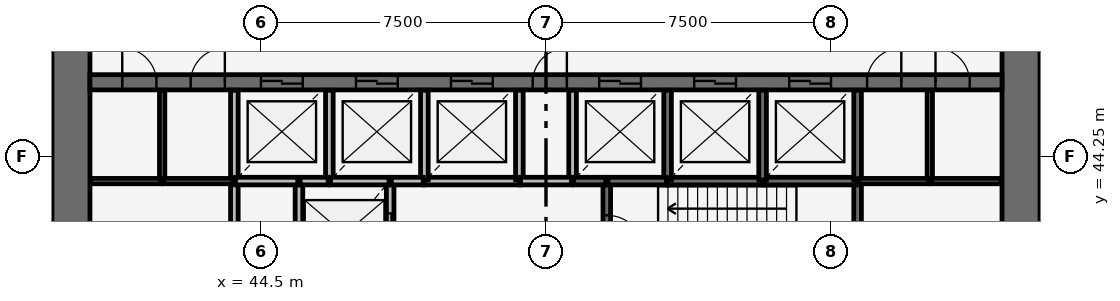
"""IFC4 building model, lengths in metres.
Left out: names, types, materials, properties, quantities, classifications, styles, units other than length and angle.
Written with IfcOpenShell. Run it as: python <this file> out.ifc"""

import sys

from ifc_helpers import new_model, si_unit, direction, frame, frame_2d, origin, place, context, subcontext, project, spatial, rectangle, extrude, source, transform, mapped, element, fill, save


model = new_model("IFC4")
c1 = context("Model", 3, precision=1e-05, world=origin(), true_north=direction((0.0, 1.0)))
c2 = subcontext(c1, "Body", "Model", "MODEL_VIEW")
j1 = project(units=[si_unit("LENGTHUNIT", "METRE"), si_unit("PLANEANGLEUNIT", "RADIAN")], contexts=[c1])
p1 = place(None, origin())
s1 = spatial("IfcSite", under=j1, at=p1, CompositionType="ELEMENT")
p2 = place(p1, origin())
s2 = spatial("IfcBuilding", under=s1, at=p2, CompositionType="ELEMENT")
p3 = place(p2, origin())
s3 = spatial("IfcBuildingStorey", under=s2, at=p3, CompositionType="ELEMENT", Elevation=0.0)
p4 = place(p3, frame((64.5, 38.0, -0.35), z_axis=(0.0, 0.0, 1.0), x_axis=(0.0, 1.0, 0.0)))
e1 = element("IfcWall", 1, at=p4, inside=s3, PredefinedType="SHEAR", context=c2, shape_type="SweptSolid", body=[
    extrude(rectangle(XDim=20.0, YDim=1.0, at=frame_2d((10.0, 0.0))), origin(), (0.0, 0.0, 1.0), 5.35),
])
p5 = place(p4, frame((9.1, 0.0, 0.35)))
e2 = element("IfcOpeningElement", 2, at=p5, cuts=e1, PredefinedType="OPENING", context=c2, shape_type="SweptSolid", body=[
    extrude(rectangle(XDim=1.8, YDim=2.1, at=frame_2d((0.9, 1.05))), frame((0.0, 0.51, 0.0), z_axis=(0.0, -1.0, 0.0), x_axis=(1.0, 0.0, 0.0)), (0.0, 0.0, 1.0), 1.02),
])
p6 = place(p3, frame((39.5, 58.0, -0.35), z_axis=(0.0, 0.0, 1.0), x_axis=(0.0, -1.0, 0.0)))
e3 = element("IfcWall", 3, at=p6, inside=s3, PredefinedType="SHEAR", context=c2, shape_type="SweptSolid", body=[
    extrude(rectangle(XDim=20.0, YDim=1.0, at=frame_2d((10.0, 0.0))), origin(), (0.0, 0.0, 1.0), 5.35),
])
p7 = place(p6, frame((9.1, 0.0, 0.35)))
e4 = element("IfcOpeningElement", 4, at=p7, cuts=e3, PredefinedType="OPENING", context=c2, shape_type="SweptSolid", body=[
    extrude(rectangle(XDim=1.8, YDim=2.1, at=frame_2d((0.9, 1.05))), frame((0.0, 0.51, 0.0), z_axis=(0.0, -1.0, 0.0), x_axis=(1.0, 0.0, 0.0)), (0.0, 0.0, 1.0), 1.02),
])
p8 = place(p3, frame((40.0, 46.2, -0.35), z_axis=(0.0, 0.0, 1.0), x_axis=(1.0, 0.0, 0.0)))
e5 = element("IfcWall", 5, at=p8, inside=s3, PredefinedType="SHEAR", context=c2, shape_type="SweptSolid", body=[
    extrude(rectangle(XDim=24.0, YDim=0.4, at=frame_2d((12.0, 0.0))), origin(), (0.0, 0.0, 1.0), 5.35),
])
p9 = place(p8, frame((13.4, 0.0, 0.35)))
e6 = element("IfcOpeningElement", 6, at=p9, cuts=e5, PredefinedType="OPENING", context=c2, shape_type="SweptSolid", body=[
    extrude(rectangle(XDim=1.1, YDim=2.1, at=frame_2d((0.55, 1.05))), frame((0.0, 0.21, 0.0), z_axis=(0.0, -1.0, 0.0), x_axis=(1.0, 0.0, 0.0)), (0.0, 0.0, 1.0), 0.42),
])
p10 = place(p8, frame((15.9, 0.0, 0.35)))
e7 = element("IfcOpeningElement", 7, at=p10, cuts=e5, PredefinedType="OPENING", context=c2, shape_type="SweptSolid", body=[
    extrude(rectangle(XDim=1.1, YDim=2.1, at=frame_2d((0.55, 1.05))), frame((0.0, 0.21, 0.0), z_axis=(0.0, -1.0, 0.0), x_axis=(1.0, 0.0, 0.0)), (0.0, 0.0, 1.0), 0.42),
])
p11 = place(p8, frame((18.4, 0.0, 0.35)))
e8 = element("IfcOpeningElement", 8, at=p11, cuts=e5, PredefinedType="OPENING", context=c2, shape_type="SweptSolid", body=[
    extrude(rectangle(XDim=1.1, YDim=2.1, at=frame_2d((0.55, 1.05))), frame((0.0, 0.21, 0.0), z_axis=(0.0, -1.0, 0.0), x_axis=(1.0, 0.0, 0.0)), (0.0, 0.0, 1.0), 0.42),
])
p12 = place(p8, frame((4.5, 0.0, 0.35)))
e9 = element("IfcOpeningElement", 9, at=p12, cuts=e5, PredefinedType="OPENING", context=c2, shape_type="SweptSolid", body=[
    extrude(rectangle(XDim=1.1, YDim=2.1, at=frame_2d((0.55, 1.05))), frame((0.0, 0.21, 0.0), z_axis=(0.0, -1.0, 0.0), x_axis=(1.0, 0.0, 0.0)), (0.0, 0.0, 1.0), 0.42),
])
p13 = place(p8, frame((7.0, 0.0, 0.35)))
e10 = element("IfcOpeningElement", 10, at=p13, cuts=e5, PredefinedType="OPENING", context=c2, shape_type="SweptSolid", body=[
    extrude(rectangle(XDim=1.1, YDim=2.1, at=frame_2d((0.55, 1.05))), frame((0.0, 0.21, 0.0), z_axis=(0.0, -1.0, 0.0), x_axis=(1.0, 0.0, 0.0)), (0.0, 0.0, 1.0), 0.42),
])
p14 = place(p8, frame((9.5, 0.0, 0.35)))
e11 = element("IfcOpeningElement", 11, at=p14, cuts=e5, PredefinedType="OPENING", context=c2, shape_type="SweptSolid", body=[
    extrude(rectangle(XDim=1.1, YDim=2.1, at=frame_2d((0.55, 1.05))), frame((0.0, 0.21, 0.0), z_axis=(0.0, -1.0, 0.0), x_axis=(1.0, 0.0, 0.0)), (0.0, 0.0, 1.0), 0.42),
])
p15 = place(p8, frame((20.45, 0.0, 0.35)))
e12 = element("IfcOpeningElement", 12, at=p15, cuts=e5, PredefinedType="OPENING", context=c2, shape_type="SweptSolid", body=[
    extrude(rectangle(XDim=0.9, YDim=2.1, at=frame_2d((0.45, 1.05))), frame((0.0, 0.21, 0.0), z_axis=(0.0, -1.0, 0.0), x_axis=(1.0, 0.0, 0.0)), (0.0, 0.0, 1.0), 0.42),
])
p16 = place(p8, frame((22.25, 0.0, 0.35)))
e13 = element("IfcOpeningElement", 13, at=p16, cuts=e5, PredefinedType="OPENING", context=c2, shape_type="SweptSolid", body=[
    extrude(rectangle(XDim=0.9, YDim=2.1, at=frame_2d((0.45, 1.05))), frame((0.0, 0.21, 0.0), z_axis=(0.0, -1.0, 0.0), x_axis=(1.0, 0.0, 0.0)), (0.0, 0.0, 1.0), 0.42),
])
p17 = place(p8, frame((0.85, 0.0, 0.35)))
e14 = element("IfcOpeningElement", 14, at=p17, cuts=e5, PredefinedType="OPENING", context=c2, shape_type="SweptSolid", body=[
    extrude(rectangle(XDim=0.9, YDim=2.1, at=frame_2d((0.45, 1.05))), frame((0.0, 0.21, 0.0), z_axis=(0.0, -1.0, 0.0), x_axis=(1.0, 0.0, 0.0)), (0.0, 0.0, 1.0), 0.42),
])
p18 = place(p8, frame((2.65, 0.0, 0.35)))
e15 = element("IfcOpeningElement", 15, at=p18, cuts=e5, PredefinedType="OPENING", context=c2, shape_type="SweptSolid", body=[
    extrude(rectangle(XDim=0.9, YDim=2.1, at=frame_2d((0.45, 1.05))), frame((0.0, 0.21, 0.0), z_axis=(0.0, -1.0, 0.0), x_axis=(1.0, 0.0, 0.0)), (0.0, 0.0, 1.0), 0.42),
])
p19 = place(p8, frame((11.65, 0.0, 0.35)))
e16 = element("IfcOpeningElement", 16, at=p19, cuts=e5, PredefinedType="OPENING", context=c2, shape_type="SweptSolid", body=[
    extrude(rectangle(XDim=0.9, YDim=2.1, at=frame_2d((0.45, 1.05))), frame((0.0, 0.21, 0.0), z_axis=(0.0, -1.0, 0.0), x_axis=(1.0, 0.0, 0.0)), (0.0, 0.0, 1.0), 0.42),
])
for number, where, z_axis, x_axis in (
    (17, (43.8, 43.6, 0.0), (0.0, 0.0, 1.0), (0.0, -1.0, 0.0)),
    (18, (45.5, 43.6, 0.0), (0.0, 0.0, 1.0), (0.0, -1.0, 0.0)),
):
    element("IfcWall", number, at=place(p3, frame(where, z_axis=z_axis, x_axis=x_axis)), inside=s3, PredefinedType="SOLIDWALL", context=c2, shape_type="SweptSolid", body=[
        extrude(rectangle(XDim=2.8, YDim=0.2, at=frame_2d((1.4, 0.0))), origin(), (0.0, 0.0, 1.0), 4.65),
    ])
p20 = place(p3, frame((47.9, 40.83, 0.0), z_axis=(0.0, 0.0, 1.0), x_axis=(0.0, 1.0, 0.0)))
e19 = element("IfcWall", 19, at=p20, inside=s3, PredefinedType="SOLIDWALL", context=c2, shape_type="SweptSolid", body=[
    extrude(rectangle(XDim=2.77, YDim=0.2, at=frame_2d((1.385, 0.0))), origin(), (0.0, 0.0, 1.0), 4.65),
])
p21 = place(p20, frame((0.82, 0.0, 0.0)))
e20 = element("IfcOpeningElement", 20, at=p21, cuts=e19, PredefinedType="OPENING", context=c2, shape_type="SweptSolid", body=[
    extrude(rectangle(XDim=1.1, YDim=2.1, at=frame_2d((0.55, 1.05))), frame((0.0, 0.11, 0.0), z_axis=(0.0, -1.0, 0.0), x_axis=(1.0, 0.0, 0.0)), (0.0, 0.0, 1.0), 0.22),
])
p22 = place(p3, frame((60.2, 40.83, 0.0), z_axis=(0.0, 0.0, 1.0), x_axis=(0.0, 1.0, 0.0)))
e21 = element("IfcWall", 21, at=p22, inside=s3, PredefinedType="SOLIDWALL", context=c2, shape_type="SweptSolid", body=[
    extrude(rectangle(XDim=2.77, YDim=0.2, at=frame_2d((1.385, 0.0))), origin(), (0.0, 0.0, 1.0), 4.65),
])
p23 = place(p3, frame((53.6, 43.6, 0.0), z_axis=(0.0, 0.0, 1.0), x_axis=(0.0, -1.0, 0.0)))
e22 = element("IfcWall", 22, at=p23, inside=s3, PredefinedType="SOLIDWALL", context=c2, shape_type="SweptSolid", body=[
    extrude(rectangle(XDim=2.77, YDim=0.2, at=frame_2d((1.385, 0.0))), origin(), (0.0, 0.0, 1.0), 4.65),
])
p24 = place(p23, frame((0.9, 0.0, 0.0)))
e23 = element("IfcOpeningElement", 23, at=p24, cuts=e22, PredefinedType="OPENING", context=c2, shape_type="SweptSolid", body=[
    extrude(rectangle(XDim=1.0, YDim=2.1, at=frame_2d((0.5, 1.05))), frame((0.0, 0.11, 0.0), z_axis=(0.0, -1.0, 0.0), x_axis=(1.0, 0.0, 0.0)), (0.0, 0.0, 1.0), 0.22),
])
for number, where, z_axis, x_axis in (
    (24, (48.8, 43.6, 0.0), (0.0, 0.0, 1.0), (1.0, 0.0, 0.0)),
    (25, (55.2, 43.6, 0.0), (0.0, 0.0, 1.0), (1.0, 0.0, 0.0)),
):
    element("IfcWall", number, at=place(p3, frame(where, z_axis=z_axis, x_axis=x_axis)), inside=s3, PredefinedType="SOLIDWALL", context=c2, shape_type="SweptSolid", body=[
        extrude(rectangle(XDim=2.5, YDim=0.2, at=frame_2d((1.25, 0.0))), origin(), (0.0, 0.0, 1.0), 4.65),
    ])
p25 = place(p3, frame((57.73, 43.6, 0.0), z_axis=(0.0, 0.0, 1.0), x_axis=(1.0, 0.0, 0.0)))
e26 = element("IfcWall", 26, at=p25, inside=s3, PredefinedType="SOLIDWALL", context=c2, shape_type="SweptSolid", body=[
    extrude(rectangle(XDim=2.44, YDim=0.2, at=frame_2d((1.22, 0.0))), origin(), (0.0, 0.0, 1.0), 4.65),
])
p26 = place(p3, frame((43.8, 45.99, 0.0), z_axis=(0.0, 0.0, 1.0), x_axis=(0.0, -1.0, 0.0)))
e27 = element("IfcWall", 27, at=p26, inside=s3, PredefinedType="SOLIDWALL", context=c2, shape_type="SweptSolid", body=[
    extrude(rectangle(XDim=2.36, YDim=0.2, at=frame_2d((1.18, 0.0))), origin(), (0.0, 0.0, 1.0), 4.65),
])
p27 = place(p3, frame((46.3, 43.6, 0.0), z_axis=(0.0, 0.0, 1.0), x_axis=(0.0, 1.0, 0.0)))
e28 = element("IfcWall", 28, at=p27, inside=s3, PredefinedType="SOLIDWALL", context=c2, shape_type="SweptSolid", body=[
    extrude(rectangle(XDim=2.39, YDim=0.2, at=frame_2d((1.195, 0.0))), origin(), (0.0, 0.0, 1.0), 4.65),
])
for number, where, z_axis, x_axis in (
    (29, (48.8, 43.63, 0.0), (0.0, 0.0, 1.0), (0.0, 1.0, 0.0)),
    (30, (51.3, 43.63, 0.0), (0.0, 0.0, 1.0), (0.0, 1.0, 0.0)),
):
    element("IfcWall", number, at=place(p3, frame(where, z_axis=z_axis, x_axis=x_axis)), inside=s3, PredefinedType="SOLIDWALL", context=c2, shape_type="SweptSolid", body=[
        extrude(rectangle(XDim=2.36, YDim=0.2, at=frame_2d((1.18, 0.0))), origin(), (0.0, 0.0, 1.0), 4.65),
    ])
p28 = place(p3, frame((52.7, 45.99, 0.0), z_axis=(0.0, 0.0, 1.0), x_axis=(0.0, -1.0, 0.0)))
e31 = element("IfcWall", 31, at=p28, inside=s3, PredefinedType="SOLIDWALL", context=c2, shape_type="SweptSolid", body=[
    extrude(rectangle(XDim=2.39, YDim=0.2, at=frame_2d((1.195, 0.0))), origin(), (0.0, 0.0, 1.0), 4.65),
])
for number, where, z_axis, x_axis in (
    (32, (55.2, 43.63, 0.0), (0.0, 0.0, 1.0), (0.0, 1.0, 0.0)),
    (33, (57.7, 43.63, 0.0), (0.0, 0.0, 1.0), (0.0, 1.0, 0.0)),
    (34, (60.2, 43.63, 0.0), (0.0, 0.0, 1.0), (0.0, 1.0, 0.0)),
):
    element("IfcWall", number, at=place(p3, frame(where, z_axis=z_axis, x_axis=x_axis)), inside=s3, PredefinedType="SOLIDWALL", context=c2, shape_type="SweptSolid", body=[
        extrude(rectangle(XDim=2.36, YDim=0.2, at=frame_2d((1.18, 0.0))), origin(), (0.0, 0.0, 1.0), 4.65),
    ])
p29 = place(p3, frame((43.83, 43.6, 0.0), z_axis=(0.0, 0.0, 1.0), x_axis=(1.0, 0.0, 0.0)))
e35 = element("IfcWall", 35, at=p29, inside=s3, PredefinedType="SOLIDWALL", context=c2, shape_type="SweptSolid", body=[
    extrude(rectangle(XDim=1.64, YDim=0.2, at=frame_2d((0.82, 0.0))), origin(), (0.0, 0.0, 1.0), 4.65),
])
for number, where, z_axis, x_axis in (
    (36, (46.33, 43.6, 0.0), (0.0, 0.0, 1.0), (1.0, 0.0, 0.0)),
    (37, (53.63, 43.6, 0.0), (0.0, 0.0, 1.0), (1.0, 0.0, 0.0)),
):
    element("IfcWall", number, at=place(p3, frame(where, z_axis=z_axis, x_axis=x_axis)), inside=s3, PredefinedType="SOLIDWALL", context=c2, shape_type="SweptSolid", body=[
        extrude(rectangle(XDim=1.54, YDim=0.2, at=frame_2d((0.77, 0.0))), origin(), (0.0, 0.0, 1.0), 4.65),
    ])
p30 = place(p3, frame((52.67, 43.6, 0.0), z_axis=(0.0, 0.0, 1.0), x_axis=(-1.0, 0.0, 0.0)))
e38 = element("IfcWall", 38, at=p30, inside=s3, PredefinedType="SOLIDWALL", context=c2, shape_type="SweptSolid", body=[
    extrude(rectangle(XDim=1.34, YDim=0.2, at=frame_2d((0.67, 0.0))), origin(), (0.0, 0.0, 1.0), 4.65),
])
for number, where, z_axis, x_axis in (
    (39, (47.93, 43.6, 0.0), (0.0, 0.0, 1.0), (1.0, 0.0, 0.0)),
    (40, (52.73, 43.6, 0.0), (0.0, 0.0, 1.0), (1.0, 0.0, 0.0)),
):
    element("IfcWall", number, at=place(p3, frame(where, z_axis=z_axis, x_axis=x_axis)), inside=s3, PredefinedType="SOLIDWALL", context=c2, shape_type="SweptSolid", body=[
        extrude(rectangle(XDim=0.84, YDim=0.2, at=frame_2d((0.42, 0.0))), origin(), (0.0, 0.0, 1.0), 4.65),
    ])
p31 = place(p3, frame((45.53, 43.6, 0.0), z_axis=(0.0, 0.0, 1.0), x_axis=(1.0, 0.0, 0.0)))
e41 = element("IfcWall", 41, at=p31, inside=s3, PredefinedType="SOLIDWALL", context=c2, shape_type="SweptSolid", body=[
    extrude(rectangle(XDim=0.74, YDim=0.2, at=frame_2d((0.37, 0.0))), origin(), (0.0, 0.0, 1.0), 4.65),
])
for number, where, z_axis, x_axis in (
    (42, (41.9, 43.6, 0.0), (0.0, 0.0, 1.0), (0.0, 1.0, 0.0)),
    (43, (62.1, 43.6, 0.0), (0.0, 0.0, 1.0), (0.0, 1.0, 0.0)),
):
    element("IfcWall", number, at=place(p3, frame(where, z_axis=z_axis, x_axis=x_axis)), inside=s3, PredefinedType="PARTITIONING", context=c2, shape_type="SweptSolid", body=[
        extrude(rectangle(XDim=2.39, YDim=0.14, at=frame_2d((1.195, 0.0))), origin(), (0.0, 0.0, 1.0), 3.85),
    ])
for number, where, z_axis, x_axis in (
    (44, (43.77, 43.6, 0.0), (0.0, 0.0, 1.0), (-1.0, 0.0, 0.0)),
    (45, (60.23, 43.6, 0.0), (0.0, 0.0, 1.0), (1.0, 0.0, 0.0)),
):
    element("IfcWall", number, at=place(p3, frame(where, z_axis=z_axis, x_axis=x_axis)), inside=s3, PredefinedType="PARTITIONING", context=c2, shape_type="SweptSolid", body=[
        extrude(rectangle(XDim=1.84, YDim=0.14, at=frame_2d((0.92, 0.0))), origin(), (0.0, 0.0, 1.0), 3.85),
    ])
for number, where, z_axis, x_axis in (
    (46, (41.87, 43.6, 0.0), (0.0, 0.0, 1.0), (-1.0, 0.0, 0.0)),
    (47, (62.13, 43.6, 0.0), (0.0, 0.0, 1.0), (1.0, 0.0, 0.0)),
):
    element("IfcWall", number, at=place(p3, frame(where, z_axis=z_axis, x_axis=x_axis)), inside=s3, PredefinedType="PARTITIONING", context=c2, shape_type="SweptSolid", body=[
        extrude(rectangle(XDim=1.85, YDim=0.14, at=frame_2d((0.925, 0.0))), origin(), (0.0, 0.0, 1.0), 3.85),
    ])
m1 = source(origin(), c2, "Body", "SweptSolid", [
    extrude(rectangle(XDim=1.1, YDim=2.1, at=frame_2d((0.55, 1.05))), frame((0.0, 0.025, 0.0), z_axis=(0.0, -1.0, 0.0), x_axis=(1.0, 0.0, 0.0)), (0.0, 0.0, 1.0), 0.05),
])
p32 = place(p9, origin())
e48 = element("IfcDoor", 48, at=p32, inside=s3, OperationType="DOUBLE_DOOR_SLIDING", PredefinedType="USERDEFINED", context=c2, shape_type="MappedRepresentation", body=[
    mapped(m1, transform((0.0, 0.0, 0.0), scale=1.0)),
])
fill(e6, e48)
p33 = place(p10, origin())
e49 = element("IfcDoor", 49, at=p33, inside=s3, OperationType="DOUBLE_DOOR_SLIDING", PredefinedType="USERDEFINED", context=c2, shape_type="MappedRepresentation", body=[
    mapped(m1, transform((0.0, 0.0, 0.0), scale=1.0)),
])
fill(e7, e49)
p34 = place(p11, origin())
e50 = element("IfcDoor", 50, at=p34, inside=s3, OperationType="DOUBLE_DOOR_SLIDING", PredefinedType="USERDEFINED", context=c2, shape_type="MappedRepresentation", body=[
    mapped(m1, transform((0.0, 0.0, 0.0), scale=1.0)),
])
fill(e8, e50)
p35 = place(p12, origin())
e51 = element("IfcDoor", 51, at=p35, inside=s3, OperationType="DOUBLE_DOOR_SLIDING", PredefinedType="USERDEFINED", context=c2, shape_type="MappedRepresentation", body=[
    mapped(m1, transform((0.0, 0.0, 0.0), scale=1.0)),
])
fill(e9, e51)
p36 = place(p13, origin())
e52 = element("IfcDoor", 52, at=p36, inside=s3, OperationType="DOUBLE_DOOR_SLIDING", PredefinedType="USERDEFINED", context=c2, shape_type="MappedRepresentation", body=[
    mapped(m1, transform((0.0, 0.0, 0.0), scale=1.0)),
])
fill(e10, e52)
p37 = place(p14, origin())
e53 = element("IfcDoor", 53, at=p37, inside=s3, OperationType="DOUBLE_DOOR_SLIDING", PredefinedType="USERDEFINED", context=c2, shape_type="MappedRepresentation", body=[
    mapped(m1, transform((0.0, 0.0, 0.0), scale=1.0)),
])
fill(e11, e53)
p38 = place(p21, origin())
e54 = element("IfcDoor", 54, at=p38, inside=s3, OperationType="DOUBLE_DOOR_SLIDING", PredefinedType="USERDEFINED", context=c2, shape_type="MappedRepresentation", body=[
    mapped(m1, transform((0.0, 0.0, 0.0), scale=1.0)),
])
fill(e20, e54)
m2 = source(origin(), c2, "Body", "SweptSolid", [
    extrude(rectangle(XDim=1.0, YDim=2.1, at=frame_2d((0.5, 1.05))), frame((0.0, 0.025, 0.0), z_axis=(0.0, -1.0, 0.0), x_axis=(1.0, 0.0, 0.0)), (0.0, 0.0, 1.0), 0.05),
])
p39 = place(p24, origin())
e55 = element("IfcDoor", 55, at=p39, inside=s3, OperationType="SINGLE_SWING_RIGHT", PredefinedType="DOOR", context=c2, shape_type="MappedRepresentation", body=[
    mapped(m2, transform((0.0, 0.0, 0.0), scale=1.0)),
])
fill(e23, e55)
m3 = source(origin(), c2, "Body", "SweptSolid", [
    extrude(rectangle(XDim=0.9, YDim=2.1, at=frame_2d((0.45, 1.05))), frame((0.0, 0.025, 0.0), z_axis=(0.0, -1.0, 0.0), x_axis=(1.0, 0.0, 0.0)), (0.0, 0.0, 1.0), 0.05),
])
p40 = place(p15, origin())
e56 = element("IfcDoor", 56, at=p40, inside=s3, OperationType="SINGLE_SWING_RIGHT", PredefinedType="DOOR", context=c2, shape_type="MappedRepresentation", body=[
    mapped(m3, transform((0.0, 0.0, 0.0), scale=1.0)),
])
fill(e12, e56)
p41 = place(p16, origin())
e57 = element("IfcDoor", 57, at=p41, inside=s3, OperationType="SINGLE_SWING_LEFT", PredefinedType="DOOR", context=c2, shape_type="MappedRepresentation", body=[
    mapped(m3, transform((0.0, 0.0, 0.0), scale=1.0)),
])
fill(e13, e57)
p42 = place(p17, origin())
e58 = element("IfcDoor", 58, at=p42, inside=s3, OperationType="SINGLE_SWING_LEFT", PredefinedType="DOOR", context=c2, shape_type="MappedRepresentation", body=[
    mapped(m3, transform((0.0, 0.0, 0.0), scale=1.0)),
])
fill(e14, e58)
p43 = place(p18, origin())
e59 = element("IfcDoor", 59, at=p43, inside=s3, OperationType="SINGLE_SWING_RIGHT", PredefinedType="DOOR", context=c2, shape_type="MappedRepresentation", body=[
    mapped(m3, transform((0.0, 0.0, 0.0), scale=1.0)),
])
fill(e15, e59)
p44 = place(p19, origin())
e60 = element("IfcDoor", 60, at=p44, inside=s3, OperationType="SINGLE_SWING_RIGHT", PredefinedType="DOOR", context=c2, shape_type="MappedRepresentation", body=[
    mapped(m3, transform((0.0, 0.0, 0.0), scale=1.0)),
])
fill(e16, e60)
save(model, sys.argv[1])
